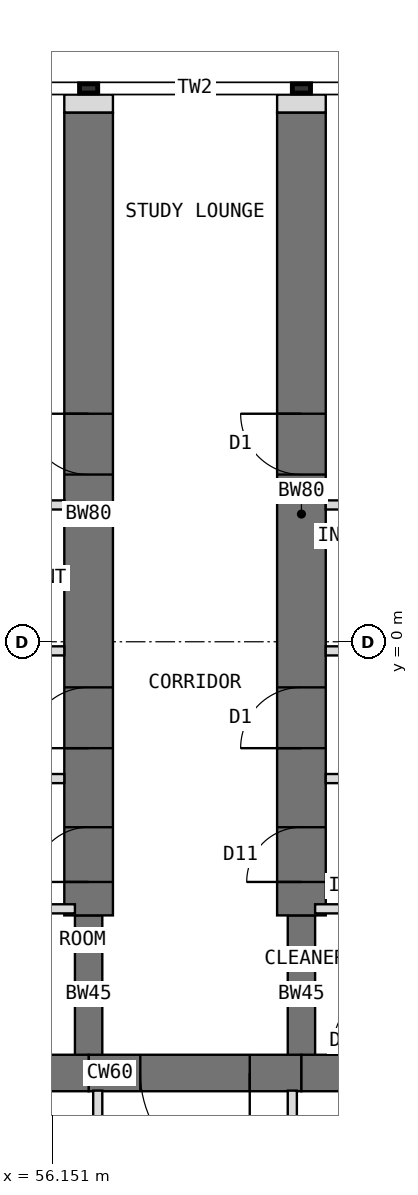
"""IFC4 building model, lengths in metres.
Left out: names, types, materials, properties, quantities, classifications, styles, units other than length and angle.
Written with IfcOpenShell. Run it as: python <this file> out.ifc"""

import sys

from ifc_helpers import new_model, si_unit, direction, frame, frame_2d, origin, place, context, subcontext, project, spatial, rectangle, extrude, element, fill, save


model = new_model("IFC4")
c1 = context("Model", 3, precision=1e-05, world=origin(), true_north=direction((0.0, 1.0)))
c2 = subcontext(c1, "Body", "Model", "MODEL_VIEW")
j1 = project(units=[si_unit("LENGTHUNIT", "METRE"), si_unit("PLANEANGLEUNIT", "RADIAN")], contexts=[c1])
p1 = place(None, origin())
s1 = spatial("IfcSite", under=j1, at=p1, CompositionType="ELEMENT")
p2 = place(p1, origin())
s2 = spatial("IfcBuilding", under=s1, at=p2, CompositionType="ELEMENT")
p3 = place(p2, frame((0.0, 0.0, 125.5)))
s3 = spatial("IfcBuildingStorey", under=s2, at=p3, CompositionType="ELEMENT", Elevation=125.5)
p4 = place(p3, frame((64.798, -7.092, 0.0), z_axis=(0.0, 0.0, 1.0), x_axis=(-1.0, 0.0, 0.0)))
e1 = element("IfcWall", 1, at=p4, inside=s3, PredefinedType="SHEAR", context=c2, shape_type="SweptSolid", body=[
    extrude(rectangle(XDim=4.548, YDim=0.6, at=frame_2d((2.274, 0.0))), origin(), (0.0, 0.0, 1.0), 4.0),
])
p5 = place(p3, frame((60.25, -7.092, 0.0), z_axis=(0.0, 0.0, 1.0), x_axis=(-1.0, 0.0, 0.0)))
e2 = element("IfcWall", 2, at=p5, inside=s3, PredefinedType="SHEAR", context=c2, shape_type="SweptSolid", body=[
    extrude(rectangle(XDim=3.5, YDim=0.6, at=frame_2d((1.75, 0.0))), origin(), (0.0, 0.0, 1.0), 4.0),
])
p6 = place(p5, frame((0.85, 0.0, 0.0)))
e3 = element("IfcOpeningElement", 3, at=p6, cuts=e2, PredefinedType="OPENING", context=c2, shape_type="SweptSolid", body=[
    extrude(rectangle(XDim=1.8, YDim=2.1, at=frame_2d((0.9, 1.05))), frame((0.0, 0.31, 0.0), z_axis=(0.0, -1.0, 0.0), x_axis=(1.0, 0.0, 0.0)), (0.0, 0.0, 1.0), 0.62),
])
p7 = place(p3, frame((56.75, -7.092, 0.0), z_axis=(0.0, 0.0, 1.0), x_axis=(-1.0, 0.0, 0.0)))
e4 = element("IfcWall", 4, at=p7, inside=s3, PredefinedType="SHEAR", context=c2, shape_type="SweptSolid", body=[
    extrude(rectangle(XDim=4.548, YDim=0.6, at=frame_2d((2.274, 0.0))), origin(), (0.0, 0.0, 1.0), 4.0),
])
p8 = place(p3, frame((56.75, -7.092, 0.0), z_axis=(0.0, 0.0, 1.0), x_axis=(0.0, 1.0, 0.0)))
e5 = element("IfcWall", 5, at=p8, inside=s3, PredefinedType="SHEAR", context=c2, shape_type="SweptSolid", body=[
    extrude(rectangle(XDim=2.592, YDim=0.45, at=frame_2d((1.296, 0.0))), origin(), (0.0, 0.0, 1.0), 4.0),
])
p9 = place(p3, frame((56.75, -4.5, 0.0), z_axis=(0.0, 0.0, 1.0), x_axis=(0.0, 1.0, 0.0)))
e6 = element("IfcWall", 6, at=p9, inside=s3, PredefinedType="SHEAR", context=c2, shape_type="SweptSolid", body=[
    extrude(rectangle(XDim=13.2, YDim=0.8, at=frame_2d((6.6, 0.0))), origin(), (0.0, 0.0, 1.0), 4.0),
])
p10 = place(p9, frame((0.55, 0.0, 0.0)))
e7 = element("IfcOpeningElement", 7, at=p10, cuts=e6, PredefinedType="OPENING", context=c2, shape_type="SweptSolid", body=[
    extrude(rectangle(XDim=0.9, YDim=2.1, at=frame_2d((0.45, 1.05))), frame((0.0, 0.41, 0.0), z_axis=(0.0, -1.0, 0.0), x_axis=(1.0, 0.0, 0.0)), (0.0, 0.0, 1.0), 0.82),
])
p11 = place(p9, frame((2.75, 0.0, 0.0)))
e8 = element("IfcOpeningElement", 8, at=p11, cuts=e6, PredefinedType="OPENING", context=c2, shape_type="SweptSolid", body=[
    extrude(rectangle(XDim=1.0, YDim=2.1, at=frame_2d((0.5, 1.05))), frame((0.0, 0.41, 0.0), z_axis=(0.0, -1.0, 0.0), x_axis=(1.0, 0.0, 0.0)), (0.0, 0.0, 1.0), 0.82),
])
p12 = place(p9, frame((7.25, 0.0, 0.0)))
e9 = element("IfcOpeningElement", 9, at=p12, cuts=e6, PredefinedType="OPENING", context=c2, shape_type="SweptSolid", body=[
    extrude(rectangle(XDim=1.0, YDim=2.1, at=frame_2d((0.5, 1.05))), frame((0.0, 0.41, 0.0), z_axis=(0.0, -1.0, 0.0), x_axis=(1.0, 0.0, 0.0)), (0.0, 0.0, 1.0), 0.82),
])
p13 = place(p3, frame((60.25, -7.092, 0.0), z_axis=(0.0, 0.0, 1.0), x_axis=(0.0, 1.0, 0.0)))
e10 = element("IfcWall", 10, at=p13, inside=s3, PredefinedType="SHEAR", context=c2, shape_type="SweptSolid", body=[
    extrude(rectangle(XDim=2.592, YDim=0.45, at=frame_2d((1.296, 0.0))), origin(), (0.0, 0.0, 1.0), 4.0),
])
p14 = place(p3, frame((60.25, -4.5, 0.0), z_axis=(0.0, 0.0, 1.0), x_axis=(0.0, 1.0, 0.0)))
e11 = element("IfcWall", 11, at=p14, inside=s3, PredefinedType="SHEAR", context=c2, shape_type="SweptSolid", body=[
    extrude(rectangle(XDim=13.2, YDim=0.8, at=frame_2d((6.6, 0.0))), origin(), (0.0, 0.0, 1.0), 4.0),
])
p15 = place(p14, frame((0.55, 0.0, 0.0)))
e12 = element("IfcOpeningElement", 12, at=p15, cuts=e11, PredefinedType="OPENING", context=c2, shape_type="SweptSolid", body=[
    extrude(rectangle(XDim=0.9, YDim=2.1, at=frame_2d((0.45, 1.05))), frame((0.0, 0.41, 0.0), z_axis=(0.0, -1.0, 0.0), x_axis=(1.0, 0.0, 0.0)), (0.0, 0.0, 1.0), 0.82),
])
p16 = place(p14, frame((2.75, 0.0, 0.0)))
e13 = element("IfcOpeningElement", 13, at=p16, cuts=e11, PredefinedType="OPENING", context=c2, shape_type="SweptSolid", body=[
    extrude(rectangle(XDim=1.0, YDim=2.1, at=frame_2d((0.5, 1.05))), frame((0.0, 0.41, 0.0), z_axis=(0.0, -1.0, 0.0), x_axis=(1.0, 0.0, 0.0)), (0.0, 0.0, 1.0), 0.82),
])
p17 = place(p14, frame((7.25, 0.0, 0.0)))
e14 = element("IfcOpeningElement", 14, at=p17, cuts=e11, PredefinedType="OPENING", context=c2, shape_type="SweptSolid", body=[
    extrude(rectangle(XDim=1.0, YDim=2.1, at=frame_2d((0.5, 1.05))), frame((0.0, 0.41, 0.0), z_axis=(0.0, -1.0, 0.0), x_axis=(1.0, 0.0, 0.0)), (0.0, 0.0, 1.0), 0.82),
])
for number, where, z_axis, x_axis in (
    (15, (56.75, 8.7, 0.0), (0.0, 0.0, 1.0), (0.0, 1.0, 0.0)),
    (16, (60.25, 8.7, 0.0), (0.0, 0.0, 1.0), (0.0, 1.0, 0.0)),
):
    element("IfcWall", number, at=place(p3, frame(where, z_axis=z_axis, x_axis=x_axis)), inside=s3, PredefinedType="PARTITIONING", context=c2, shape_type="SweptSolid", body=[
        extrude(rectangle(XDim=0.3, YDim=0.8, at=frame_2d((0.15, 0.0))), origin(), (0.0, 0.0, 1.0), 3.8),
    ])
for number, where, z_axis, x_axis in (
    (17, (56.35, -2.25, 0.0), (0.0, 0.0, 1.0), (-1.0, 0.0, 0.0)),
    (18, (56.35, 2.25, 0.0), (0.0, 0.0, 1.0), (-1.0, 0.0, 0.0)),
):
    element("IfcWall", number, at=place(p3, frame(where, z_axis=z_axis, x_axis=x_axis)), inside=s3, PredefinedType="PARTITIONING", context=c2, shape_type="SweptSolid", body=[
        extrude(rectangle(XDim=4.6, YDim=0.15, at=frame_2d((2.3, 0.0))), origin(), (0.0, 0.0, 1.0), 3.8),
    ])
p18 = place(p3, frame((56.35, -0.15, 0.0), z_axis=(0.0, 0.0, 1.0), x_axis=(-1.0, 0.0, 0.0)))
e19 = element("IfcWall", 19, at=p18, inside=s3, PredefinedType="PARTITIONING", context=c2, shape_type="SweptSolid", body=[
    extrude(rectangle(XDim=2.4, YDim=0.15, at=frame_2d((1.2, 0.0))), origin(), (0.0, 0.0, 1.0), 3.8),
])
p19 = place(p18, frame((0.7, 0.0, 0.0)))
e20 = element("IfcOpeningElement", 20, at=p19, cuts=e19, PredefinedType="OPENING", context=c2, shape_type="SweptSolid", body=[
    extrude(rectangle(XDim=1.0, YDim=2.1, at=frame_2d((0.5, 1.05))), frame((0.0, 0.085, 0.0), z_axis=(0.0, -1.0, 0.0), x_axis=(1.0, 0.0, 0.0)), (0.0, 0.0, 1.0), 0.17),
])
p20 = place(p3, frame((56.525, -4.392, 0.0), z_axis=(0.0, 0.0, 1.0), x_axis=(-1.0, 0.0, 0.0)))
e21 = element("IfcWall", 21, at=p20, inside=s3, PredefinedType="PARTITIONING", context=c2, shape_type="SweptSolid", body=[
    extrude(rectangle(XDim=3.2, YDim=0.15, at=frame_2d((1.6, 0.0))), origin(), (0.0, 0.0, 1.0), 3.8),
])
for number, where, z_axis, x_axis in (
    (22, (60.65, -2.25, 0.0), (0.0, 0.0, 1.0), (1.0, 0.0, 0.0)),
    (23, (60.65, 2.25, 0.0), (0.0, 0.0, 1.0), (1.0, 0.0, 0.0)),
):
    element("IfcWall", number, at=place(p3, frame(where, z_axis=z_axis, x_axis=x_axis)), inside=s3, PredefinedType="PARTITIONING", context=c2, shape_type="SweptSolid", body=[
        extrude(rectangle(XDim=4.6, YDim=0.15, at=frame_2d((2.3, 0.0))), origin(), (0.0, 0.0, 1.0), 3.8),
    ])
p21 = place(p3, frame((60.65, -0.15, 0.0), z_axis=(0.0, 0.0, 1.0), x_axis=(1.0, 0.0, 0.0)))
e24 = element("IfcWall", 24, at=p21, inside=s3, PredefinedType="PARTITIONING", context=c2, shape_type="SweptSolid", body=[
    extrude(rectangle(XDim=2.4, YDim=0.15, at=frame_2d((1.2, 0.0))), origin(), (0.0, 0.0, 1.0), 3.8),
])
p22 = place(p21, frame((0.7, 0.0, 0.0)))
e25 = element("IfcOpeningElement", 25, at=p22, cuts=e24, PredefinedType="OPENING", context=c2, shape_type="SweptSolid", body=[
    extrude(rectangle(XDim=1.0, YDim=2.1, at=frame_2d((0.5, 1.05))), frame((0.0, 0.085, 0.0), z_axis=(0.0, -1.0, 0.0), x_axis=(1.0, 0.0, 0.0)), (0.0, 0.0, 1.0), 0.17),
])
p23 = place(p3, frame((60.475, -4.392, 0.0), z_axis=(0.0, 0.0, 1.0), x_axis=(1.0, 0.0, 0.0)))
e26 = element("IfcWall", 26, at=p23, inside=s3, PredefinedType="PARTITIONING", context=c2, shape_type="SweptSolid", body=[
    extrude(rectangle(XDim=1.2, YDim=0.15, at=frame_2d((0.6, 0.0))), origin(), (0.0, 0.0, 1.0), 3.8),
])
p24 = place(p3, frame((56.9, -11.9, 0.0), z_axis=(0.0, 0.0, 1.0), x_axis=(0.0, 1.0, 0.0)))
e27 = element("IfcWall", 27, at=p24, inside=s3, PredefinedType="PARTITIONING", context=c2, shape_type="SweptSolid", body=[
    extrude(rectangle(XDim=4.519, YDim=0.15, at=frame_2d((2.259, 0.0))), origin(), (0.0, 0.0, 1.0), 3.8),
])
p25 = place(p24, frame((1.769, 0.0, 0.0)))
e28 = element("IfcOpeningElement", 28, at=p25, cuts=e27, PredefinedType="OPENING", context=c2, shape_type="SweptSolid", body=[
    extrude(rectangle(XDim=1.0, YDim=2.1, at=frame_2d((0.5, 1.05))), frame((0.0, 0.085, 0.0), z_axis=(0.0, -1.0, 0.0), x_axis=(1.0, 0.0, 0.0)), (0.0, 0.0, 1.0), 0.17),
])
p26 = place(p3, frame((60.1, -7.382, 0.0), z_axis=(0.0, 0.0, 1.0), x_axis=(0.0, -1.0, 0.0)))
e29 = element("IfcWall", 29, at=p26, inside=s3, PredefinedType="PARTITIONING", context=c2, shape_type="SweptSolid", body=[
    extrude(rectangle(XDim=4.519, YDim=0.15, at=frame_2d((2.259, 0.0))), origin(), (0.0, 0.0, 1.0), 3.8),
])
p27 = place(p26, frame((1.749, 0.0, 0.0)))
e30 = element("IfcOpeningElement", 30, at=p27, cuts=e29, PredefinedType="OPENING", context=c2, shape_type="SweptSolid", body=[
    extrude(rectangle(XDim=1.0, YDim=2.1, at=frame_2d((0.5, 1.05))), frame((0.0, 0.085, 0.0), z_axis=(0.0, -1.0, 0.0), x_axis=(1.0, 0.0, 0.0)), (0.0, 0.0, 1.0), 0.17),
])
p28 = place(p6, origin())
e31 = element("IfcDoor", 31, at=p28, inside=s3, OperationType="DOUBLE_DOOR_DOUBLE_SWING", PredefinedType="DOOR", context=c2, shape_type="SweptSolid", body=[
    extrude(rectangle(XDim=1.72, YDim=2.06, at=frame_2d((0.9, 1.03))), frame((0.0, 0.025, 0.0), z_axis=(0.0, -1.0, 0.0), x_axis=(1.0, 0.0, 0.0)), (0.0, 0.0, 1.0), 0.05),
    extrude(rectangle(XDim=0.04, YDim=2.1, at=frame_2d((0.02, 1.05))), frame((0.0, 0.3, 0.0), z_axis=(0.0, -1.0, 0.0), x_axis=(1.0, 0.0, 0.0)), (0.0, 0.0, 1.0), 0.6),
    extrude(rectangle(XDim=0.04, YDim=2.1, at=frame_2d((1.78, 1.05))), frame((0.0, 0.3, 0.0), z_axis=(0.0, -1.0, 0.0), x_axis=(1.0, 0.0, 0.0)), (0.0, 0.0, 1.0), 0.6),
    extrude(rectangle(XDim=1.72, YDim=0.04, at=frame_2d((0.9, 2.08))), frame((0.0, 0.3, 0.0), z_axis=(0.0, -1.0, 0.0), x_axis=(1.0, 0.0, 0.0)), (0.0, 0.0, 1.0), 0.6),
])
fill(e3, e31)
p29 = place(p10, origin())
e32 = element("IfcDoor", 32, at=p29, inside=s3, OperationType="SINGLE_SWING_LEFT", PredefinedType="DOOR", context=c2, shape_type="SweptSolid", body=[
    extrude(rectangle(XDim=0.82, YDim=2.06, at=frame_2d((0.45, 1.03))), frame((0.0, 0.025, 0.0), z_axis=(0.0, -1.0, 0.0), x_axis=(1.0, 0.0, 0.0)), (0.0, 0.0, 1.0), 0.05),
    extrude(rectangle(XDim=0.04, YDim=2.1, at=frame_2d((0.02, 1.05))), frame((0.0, 0.4, 0.0), z_axis=(0.0, -1.0, 0.0), x_axis=(1.0, 0.0, 0.0)), (0.0, 0.0, 1.0), 0.8),
    extrude(rectangle(XDim=0.04, YDim=2.1, at=frame_2d((0.88, 1.05))), frame((0.0, 0.4, 0.0), z_axis=(0.0, -1.0, 0.0), x_axis=(1.0, 0.0, 0.0)), (0.0, 0.0, 1.0), 0.8),
    extrude(rectangle(XDim=0.82, YDim=0.04, at=frame_2d((0.45, 2.08))), frame((0.0, 0.4, 0.0), z_axis=(0.0, -1.0, 0.0), x_axis=(1.0, 0.0, 0.0)), (0.0, 0.0, 1.0), 0.8),
])
fill(e7, e32)
p30 = place(p11, origin())
e33 = element("IfcDoor", 33, at=p30, inside=s3, OperationType="SINGLE_SWING_LEFT", PredefinedType="DOOR", context=c2, shape_type="SweptSolid", body=[
    extrude(rectangle(XDim=0.92, YDim=2.06, at=frame_2d((0.5, 1.03))), frame((0.0, 0.025, 0.0), z_axis=(0.0, -1.0, 0.0), x_axis=(1.0, 0.0, 0.0)), (0.0, 0.0, 1.0), 0.05),
    extrude(rectangle(XDim=0.04, YDim=2.1, at=frame_2d((0.02, 1.05))), frame((0.0, 0.4, 0.0), z_axis=(0.0, -1.0, 0.0), x_axis=(1.0, 0.0, 0.0)), (0.0, 0.0, 1.0), 0.8),
    extrude(rectangle(XDim=0.04, YDim=2.1, at=frame_2d((0.98, 1.05))), frame((0.0, 0.4, 0.0), z_axis=(0.0, -1.0, 0.0), x_axis=(1.0, 0.0, 0.0)), (0.0, 0.0, 1.0), 0.8),
    extrude(rectangle(XDim=0.92, YDim=0.04, at=frame_2d((0.5, 2.08))), frame((0.0, 0.4, 0.0), z_axis=(0.0, -1.0, 0.0), x_axis=(1.0, 0.0, 0.0)), (0.0, 0.0, 1.0), 0.8),
])
fill(e8, e33)
p31 = place(p12, origin())
e34 = element("IfcDoor", 34, at=p31, inside=s3, OperationType="SINGLE_SWING_RIGHT", PredefinedType="DOOR", context=c2, shape_type="SweptSolid", body=[
    extrude(rectangle(XDim=0.92, YDim=2.06, at=frame_2d((0.5, 1.03))), frame((0.0, 0.025, 0.0), z_axis=(0.0, -1.0, 0.0), x_axis=(1.0, 0.0, 0.0)), (0.0, 0.0, 1.0), 0.05),
    extrude(rectangle(XDim=0.04, YDim=2.1, at=frame_2d((0.02, 1.05))), frame((0.0, 0.4, 0.0), z_axis=(0.0, -1.0, 0.0), x_axis=(1.0, 0.0, 0.0)), (0.0, 0.0, 1.0), 0.8),
    extrude(rectangle(XDim=0.04, YDim=2.1, at=frame_2d((0.98, 1.05))), frame((0.0, 0.4, 0.0), z_axis=(0.0, -1.0, 0.0), x_axis=(1.0, 0.0, 0.0)), (0.0, 0.0, 1.0), 0.8),
    extrude(rectangle(XDim=0.92, YDim=0.04, at=frame_2d((0.5, 2.08))), frame((0.0, 0.4, 0.0), z_axis=(0.0, -1.0, 0.0), x_axis=(1.0, 0.0, 0.0)), (0.0, 0.0, 1.0), 0.8),
])
fill(e9, e34)
p32 = place(p15, origin())
e35 = element("IfcDoor", 35, at=p32, inside=s3, OperationType="SINGLE_SWING_LEFT", PredefinedType="DOOR", context=c2, shape_type="SweptSolid", body=[
    extrude(rectangle(XDim=0.82, YDim=2.06, at=frame_2d((0.45, 1.03))), frame((0.0, 0.025, 0.0), z_axis=(0.0, -1.0, 0.0), x_axis=(1.0, 0.0, 0.0)), (0.0, 0.0, 1.0), 0.05),
    extrude(rectangle(XDim=0.04, YDim=2.1, at=frame_2d((0.02, 1.05))), frame((0.0, 0.4, 0.0), z_axis=(0.0, -1.0, 0.0), x_axis=(1.0, 0.0, 0.0)), (0.0, 0.0, 1.0), 0.8),
    extrude(rectangle(XDim=0.04, YDim=2.1, at=frame_2d((0.88, 1.05))), frame((0.0, 0.4, 0.0), z_axis=(0.0, -1.0, 0.0), x_axis=(1.0, 0.0, 0.0)), (0.0, 0.0, 1.0), 0.8),
    extrude(rectangle(XDim=0.82, YDim=0.04, at=frame_2d((0.45, 2.08))), frame((0.0, 0.4, 0.0), z_axis=(0.0, -1.0, 0.0), x_axis=(1.0, 0.0, 0.0)), (0.0, 0.0, 1.0), 0.8),
])
fill(e12, e35)
p33 = place(p16, origin())
e36 = element("IfcDoor", 36, at=p33, inside=s3, OperationType="SINGLE_SWING_LEFT", PredefinedType="DOOR", context=c2, shape_type="SweptSolid", body=[
    extrude(rectangle(XDim=0.92, YDim=2.06, at=frame_2d((0.5, 1.03))), frame((0.0, 0.025, 0.0), z_axis=(0.0, -1.0, 0.0), x_axis=(1.0, 0.0, 0.0)), (0.0, 0.0, 1.0), 0.05),
    extrude(rectangle(XDim=0.04, YDim=2.1, at=frame_2d((0.02, 1.05))), frame((0.0, 0.4, 0.0), z_axis=(0.0, -1.0, 0.0), x_axis=(1.0, 0.0, 0.0)), (0.0, 0.0, 1.0), 0.8),
    extrude(rectangle(XDim=0.04, YDim=2.1, at=frame_2d((0.98, 1.05))), frame((0.0, 0.4, 0.0), z_axis=(0.0, -1.0, 0.0), x_axis=(1.0, 0.0, 0.0)), (0.0, 0.0, 1.0), 0.8),
    extrude(rectangle(XDim=0.92, YDim=0.04, at=frame_2d((0.5, 2.08))), frame((0.0, 0.4, 0.0), z_axis=(0.0, -1.0, 0.0), x_axis=(1.0, 0.0, 0.0)), (0.0, 0.0, 1.0), 0.8),
])
fill(e13, e36)
p34 = place(p17, origin())
e37 = element("IfcDoor", 37, at=p34, inside=s3, OperationType="SINGLE_SWING_RIGHT", PredefinedType="DOOR", context=c2, shape_type="SweptSolid", body=[
    extrude(rectangle(XDim=0.92, YDim=2.06, at=frame_2d((0.5, 1.03))), frame((0.0, 0.025, 0.0), z_axis=(0.0, -1.0, 0.0), x_axis=(1.0, 0.0, 0.0)), (0.0, 0.0, 1.0), 0.05),
    extrude(rectangle(XDim=0.04, YDim=2.1, at=frame_2d((0.02, 1.05))), frame((0.0, 0.4, 0.0), z_axis=(0.0, -1.0, 0.0), x_axis=(1.0, 0.0, 0.0)), (0.0, 0.0, 1.0), 0.8),
    extrude(rectangle(XDim=0.04, YDim=2.1, at=frame_2d((0.98, 1.05))), frame((0.0, 0.4, 0.0), z_axis=(0.0, -1.0, 0.0), x_axis=(1.0, 0.0, 0.0)), (0.0, 0.0, 1.0), 0.8),
    extrude(rectangle(XDim=0.92, YDim=0.04, at=frame_2d((0.5, 2.08))), frame((0.0, 0.4, 0.0), z_axis=(0.0, -1.0, 0.0), x_axis=(1.0, 0.0, 0.0)), (0.0, 0.0, 1.0), 0.8),
])
fill(e14, e37)
save(model, sys.argv[1])
